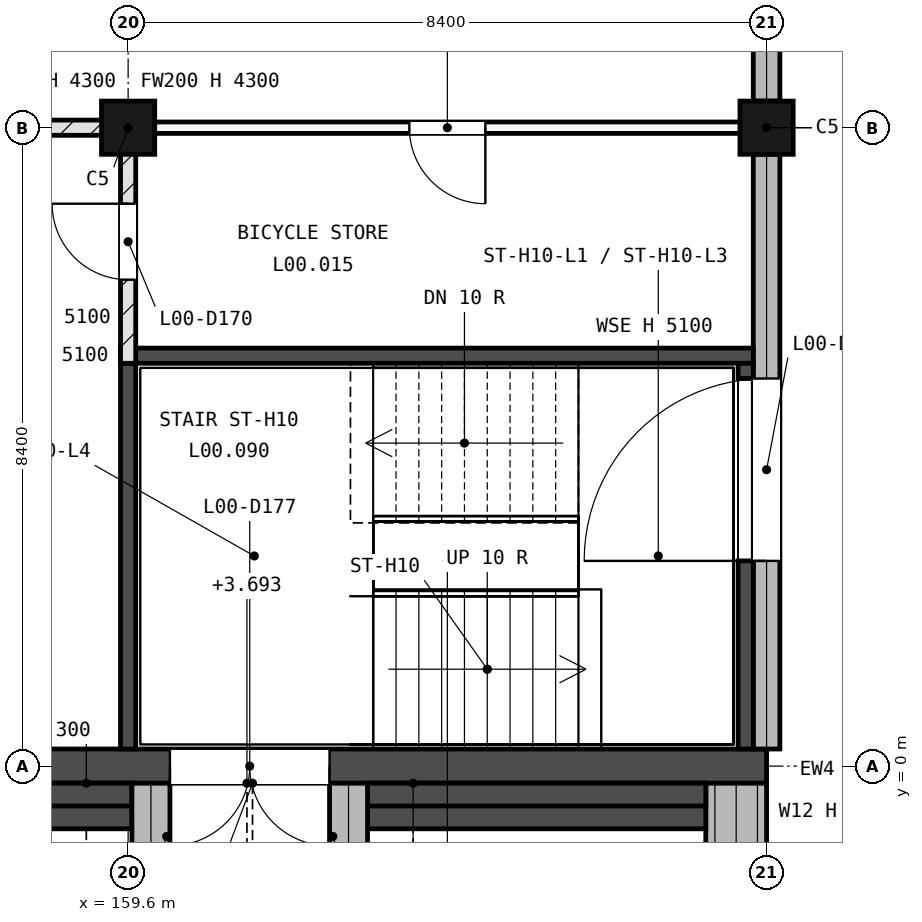
"""IFC4 building model, lengths in metres.
Left out: names, types, materials, properties, quantities, classifications, styles, units other than length and angle.
Written with IfcOpenShell. Run it as: python <this file> out.ifc"""

import sys

from ifc_helpers import new_model, si_unit, direction, frame, frame_2d, origin, origin_2d, place, context, subcontext, project, spatial, rectangle, extrude, element, fill, save


model = new_model("IFC4")
c1 = context("Model", 3, precision=1e-05, world=origin(), true_north=direction((0.0, 1.0)))
c2 = subcontext(c1, "Body", "Model", "MODEL_VIEW")
j1 = project(units=[si_unit("LENGTHUNIT", "METRE"), si_unit("PLANEANGLEUNIT", "RADIAN")], contexts=[c1])
p1 = place(None, origin())
s1 = spatial("IfcSite", under=j1, at=p1, CompositionType="ELEMENT")
p2 = place(p1, origin())
s2 = spatial("IfcBuilding", under=s1, at=p2, CompositionType="ELEMENT")
p3 = place(p2, origin())
s3 = spatial("IfcBuildingStorey", under=s2, at=p3, CompositionType="ELEMENT", Elevation=0.0)
for number, where, z_axis, x_axis in (
    (1, (159.6, 8.4, -0.3), (0.0, 0.0, 1.0), (1.0, 0.0, 0.0)),
    (2, (168.0, 8.4, -0.3), (0.0, 0.0, 1.0), (1.0, 0.0, 0.0)),
):
    element("IfcColumn", number, at=place(p3, frame(where, z_axis=z_axis, x_axis=x_axis)), inside=s3, PredefinedType="COLUMN", context=c2, shape_type="SweptSolid", body=[
        extrude(rectangle(XDim=0.7, YDim=0.7, at=origin_2d()), origin(), (0.0, 0.0, 1.0), 5.4),
    ])
p4 = place(p3, frame((0.0, 0.0, -0.3), z_axis=(0.0, 0.0, 1.0), x_axis=(1.0, 0.0, 0.0)))
e3 = element("IfcWall", 3, at=p4, inside=s3, PredefinedType="SOLIDWALL", context=c2, shape_type="SweptSolid", body=[
    extrude(rectangle(XDim=168.0, YDim=0.45, at=frame_2d((84.0, 0.0))), origin(), (0.0, 0.0, 1.0), 5.4),
])
p5 = place(p4, frame((34.8, 0.0, 2.7)))
e4 = element("IfcOpeningElement", 4, at=p5, cuts=e3, PredefinedType="OPENING", context=c2, shape_type="SweptSolid", body=[
    extrude(rectangle(XDim=1.8, YDim=1.2, at=frame_2d((0.9, 0.6))), frame((0.0, 0.235, 0.0), z_axis=(0.0, -1.0, 0.0), x_axis=(1.0, 0.0, 0.0)), (0.0, 0.0, 1.0), 0.47),
])
p6 = place(p4, frame((69.075, 0.0, 1.5)))
e5 = element("IfcOpeningElement", 5, at=p6, cuts=e3, PredefinedType="OPENING", context=c2, shape_type="SweptSolid", body=[
    extrude(rectangle(XDim=0.45, YDim=2.4, at=frame_2d((0.225, 1.2))), frame((0.0, 0.235, 0.0), z_axis=(0.0, -1.0, 0.0), x_axis=(1.0, 0.0, 0.0)), (0.0, 0.0, 1.0), 0.47),
])
p7 = place(p4, frame((73.275, 0.0, 1.5)))
e6 = element("IfcOpeningElement", 6, at=p7, cuts=e3, PredefinedType="OPENING", context=c2, shape_type="SweptSolid", body=[
    extrude(rectangle(XDim=0.45, YDim=2.4, at=frame_2d((0.225, 1.2))), frame((0.0, 0.235, 0.0), z_axis=(0.0, -1.0, 0.0), x_axis=(1.0, 0.0, 0.0)), (0.0, 0.0, 1.0), 0.47),
])
p8 = place(p4, frame((135.0, 0.0, 2.7)))
e7 = element("IfcOpeningElement", 7, at=p8, cuts=e3, PredefinedType="OPENING", context=c2, shape_type="SweptSolid", body=[
    extrude(rectangle(XDim=1.8, YDim=1.2, at=frame_2d((0.9, 0.6))), frame((0.0, 0.235, 0.0), z_axis=(0.0, -1.0, 0.0), x_axis=(1.0, 0.0, 0.0)), (0.0, 0.0, 1.0), 0.47),
])
p9 = place(p4, frame((144.0, 0.0, 2.7)))
e8 = element("IfcOpeningElement", 8, at=p9, cuts=e3, PredefinedType="OPENING", context=c2, shape_type="SweptSolid", body=[
    extrude(rectangle(XDim=1.8, YDim=1.2, at=frame_2d((0.9, 0.6))), frame((0.0, 0.235, 0.0), z_axis=(0.0, -1.0, 0.0), x_axis=(1.0, 0.0, 0.0)), (0.0, 0.0, 1.0), 0.47),
])
p10 = place(p4, frame((114.6, 0.0, 0.3), z_axis=(0.0, 0.0, 1.0), x_axis=(-1.0, 0.0, 0.0)))
e9 = element("IfcOpeningElement", 9, at=p10, cuts=e3, PredefinedType="OPENING", context=c2, shape_type="SweptSolid", body=[
    extrude(rectangle(XDim=2.1, YDim=2.2, at=frame_2d((1.05, 1.1))), frame((0.0, 0.235, 0.0), z_axis=(0.0, -1.0, 0.0), x_axis=(1.0, 0.0, 0.0)), (0.0, 0.0, 1.0), 0.47),
])
p11 = place(p4, frame((117.3, 0.0, 0.3), z_axis=(0.0, 0.0, 1.0), x_axis=(-1.0, 0.0, 0.0)))
e10 = element("IfcOpeningElement", 10, at=p11, cuts=e3, PredefinedType="OPENING", context=c2, shape_type="SweptSolid", body=[
    extrude(rectangle(XDim=2.1, YDim=2.2, at=frame_2d((1.05, 1.1))), frame((0.0, 0.235, 0.0), z_axis=(0.0, -1.0, 0.0), x_axis=(1.0, 0.0, 0.0)), (0.0, 0.0, 1.0), 0.47),
])
p12 = place(p4, frame((106.05, 0.0, 0.3), z_axis=(0.0, 0.0, 1.0), x_axis=(-1.0, 0.0, 0.0)))
e11 = element("IfcOpeningElement", 11, at=p12, cuts=e3, PredefinedType="OPENING", context=c2, shape_type="SweptSolid", body=[
    extrude(rectangle(XDim=2.1, YDim=2.2, at=frame_2d((1.05, 1.1))), frame((0.0, 0.235, 0.0), z_axis=(0.0, -1.0, 0.0), x_axis=(1.0, 0.0, 0.0)), (0.0, 0.0, 1.0), 0.47),
])
p13 = place(p4, frame((57.25, 0.0, 0.3), z_axis=(0.0, 0.0, 1.0), x_axis=(-1.0, 0.0, 0.0)))
e12 = element("IfcOpeningElement", 12, at=p13, cuts=e3, PredefinedType="OPENING", context=c2, shape_type="SweptSolid", body=[
    extrude(rectangle(XDim=2.1, YDim=2.2, at=frame_2d((1.05, 1.1))), frame((0.0, 0.235, 0.0), z_axis=(0.0, -1.0, 0.0), x_axis=(1.0, 0.0, 0.0)), (0.0, 0.0, 1.0), 0.47),
])
p14 = place(p4, frame((120.75, 0.0, 0.3), z_axis=(0.0, 0.0, 1.0), x_axis=(-1.0, 0.0, 0.0)))
e13 = element("IfcOpeningElement", 13, at=p14, cuts=e3, PredefinedType="OPENING", context=c2, shape_type="SweptSolid", body=[
    extrude(rectangle(XDim=2.1, YDim=2.2, at=frame_2d((1.05, 1.1))), frame((0.0, 0.235, 0.0), z_axis=(0.0, -1.0, 0.0), x_axis=(1.0, 0.0, 0.0)), (0.0, 0.0, 1.0), 0.47),
])
p15 = place(p4, frame((124.95, 0.0, 0.3), z_axis=(0.0, 0.0, 1.0), x_axis=(-1.0, 0.0, 0.0)))
e14 = element("IfcOpeningElement", 14, at=p15, cuts=e3, PredefinedType="OPENING", context=c2, shape_type="SweptSolid", body=[
    extrude(rectangle(XDim=2.1, YDim=2.2, at=frame_2d((1.05, 1.1))), frame((0.0, 0.235, 0.0), z_axis=(0.0, -1.0, 0.0), x_axis=(1.0, 0.0, 0.0)), (0.0, 0.0, 1.0), 0.47),
])
p16 = place(p4, frame((19.45, 0.0, 0.3), z_axis=(0.0, 0.0, 1.0), x_axis=(-1.0, 0.0, 0.0)))
e15 = element("IfcOpeningElement", 15, at=p16, cuts=e3, PredefinedType="OPENING", context=c2, shape_type="SweptSolid", body=[
    extrude(rectangle(XDim=2.1, YDim=2.2, at=frame_2d((1.05, 1.1))), frame((0.0, 0.235, 0.0), z_axis=(0.0, -1.0, 0.0), x_axis=(1.0, 0.0, 0.0)), (0.0, 0.0, 1.0), 0.47),
])
p17 = place(p4, frame((162.25, 0.0, 0.3), z_axis=(0.0, 0.0, 1.0), x_axis=(-1.0, 0.0, 0.0)))
e16 = element("IfcOpeningElement", 16, at=p17, cuts=e3, PredefinedType="OPENING", context=c2, shape_type="SweptSolid", body=[
    extrude(rectangle(XDim=2.1, YDim=2.2, at=frame_2d((1.05, 1.1))), frame((0.0, 0.235, 0.0), z_axis=(0.0, -1.0, 0.0), x_axis=(1.0, 0.0, 0.0)), (0.0, 0.0, 1.0), 0.47),
])
p18 = place(p4, frame((4.8, 0.0, 0.3), z_axis=(0.0, 0.0, 1.0), x_axis=(-1.0, 0.0, 0.0)))
e17 = element("IfcOpeningElement", 17, at=p18, cuts=e3, PredefinedType="OPENING", context=c2, shape_type="SweptSolid", body=[
    extrude(rectangle(XDim=1.2, YDim=2.2, at=frame_2d((0.6, 1.1))), frame((0.0, 0.235, 0.0), z_axis=(0.0, -1.0, 0.0), x_axis=(1.0, 0.0, 0.0)), (0.0, 0.0, 1.0), 0.47),
])
p19 = place(p4, frame((64.8, 0.0, 0.3), z_axis=(0.0, 0.0, 1.0), x_axis=(-1.0, 0.0, 0.0)))
e18 = element("IfcOpeningElement", 18, at=p19, cuts=e3, PredefinedType="OPENING", context=c2, shape_type="SweptSolid", body=[
    extrude(rectangle(XDim=1.2, YDim=2.2, at=frame_2d((0.6, 1.1))), frame((0.0, 0.235, 0.0), z_axis=(0.0, -1.0, 0.0), x_axis=(1.0, 0.0, 0.0)), (0.0, 0.0, 1.0), 0.47),
])
p20 = place(p4, frame((81.0, 0.0, 0.3), z_axis=(0.0, 0.0, 1.0), x_axis=(-1.0, 0.0, 0.0)))
e19 = element("IfcOpeningElement", 19, at=p20, cuts=e3, PredefinedType="OPENING", context=c2, shape_type="SweptSolid", body=[
    extrude(rectangle(XDim=2.4, YDim=2.4, at=frame_2d((1.2, 1.2))), frame((0.0, 0.235, 0.0), z_axis=(0.0, -1.0, 0.0), x_axis=(1.0, 0.0, 0.0)), (0.0, 0.0, 1.0), 0.47),
])
p21 = place(p4, frame((97.8, 0.0, 0.3), z_axis=(0.0, 0.0, 1.0), x_axis=(-1.0, 0.0, 0.0)))
e20 = element("IfcOpeningElement", 20, at=p21, cuts=e3, PredefinedType="OPENING", context=c2, shape_type="SweptSolid", body=[
    extrude(rectangle(XDim=2.4, YDim=2.4, at=frame_2d((1.2, 1.2))), frame((0.0, 0.235, 0.0), z_axis=(0.0, -1.0, 0.0), x_axis=(1.0, 0.0, 0.0)), (0.0, 0.0, 1.0), 0.47),
])
p22 = place(p4, frame((139.8, 0.0, 0.3), z_axis=(0.0, 0.0, 1.0), x_axis=(-1.0, 0.0, 0.0)))
e21 = element("IfcOpeningElement", 21, at=p22, cuts=e3, PredefinedType="OPENING", context=c2, shape_type="SweptSolid", body=[
    extrude(rectangle(XDim=2.4, YDim=2.1, at=frame_2d((1.2, 1.05))), frame((0.0, 0.235, 0.0), z_axis=(0.0, -1.0, 0.0), x_axis=(1.0, 0.0, 0.0)), (0.0, 0.0, 1.0), 0.47),
])
p23 = place(p4, frame((156.3, 0.0, 0.3), z_axis=(0.0, 0.0, 1.0), x_axis=(-1.0, 0.0, 0.0)))
e22 = element("IfcOpeningElement", 22, at=p23, cuts=e3, PredefinedType="OPENING", context=c2, shape_type="SweptSolid", body=[
    extrude(rectangle(XDim=1.8, YDim=2.2, at=frame_2d((0.9, 1.1))), frame((0.0, 0.235, 0.0), z_axis=(0.0, -1.0, 0.0), x_axis=(1.0, 0.0, 0.0)), (0.0, 0.0, 1.0), 0.47),
])
p24 = place(p3, frame((168.0, 0.225, 0.0), z_axis=(0.0, 0.0, 1.0), x_axis=(0.0, 1.0, 0.0)))
e23 = element("IfcWall", 23, at=p24, inside=s3, PredefinedType="STANDARD", context=c2, shape_type="SweptSolid", body=[
    extrude(rectangle(XDim=7.825, YDim=0.35, at=frame_2d((3.913, 0.0))), origin(), (0.0, 0.0, 1.0), 5.1),
])
p25 = place(p24, frame((4.875, 0.0, 0.0), z_axis=(0.0, 0.0, 1.0), x_axis=(-1.0, 0.0, 0.0)))
e24 = element("IfcOpeningElement", 24, at=p25, cuts=e23, PredefinedType="OPENING", context=c2, shape_type="SweptSolid", body=[
    extrude(rectangle(XDim=2.4, YDim=2.2, at=frame_2d((1.2, 1.1))), frame((0.0, 0.185, 0.0), z_axis=(0.0, -1.0, 0.0), x_axis=(1.0, 0.0, 0.0)), (0.0, 0.0, 1.0), 0.37),
])
p26 = place(p3, frame((168.0, 8.75, 0.0), z_axis=(0.0, 0.0, 1.0), x_axis=(0.0, 1.0, 0.0)))
e25 = element("IfcWall", 25, at=p26, inside=s3, PredefinedType="STANDARD", context=c2, shape_type="SweptSolid", body=[
    extrude(rectangle(XDim=7.7, YDim=0.35, at=frame_2d((3.85, 0.0))), origin(), (0.0, 0.0, 1.0), 4.45),
])
p27 = place(p26, frame((2.8, 0.0, 0.0), z_axis=(0.0, 0.0, 1.0), x_axis=(-1.0, 0.0, 0.0)))
e26 = element("IfcOpeningElement", 26, at=p27, cuts=e25, PredefinedType="OPENING", context=c2, shape_type="SweptSolid", body=[
    extrude(rectangle(XDim=2.1, YDim=2.2, at=frame_2d((1.05, 1.1))), frame((0.0, 0.185, 0.0), z_axis=(0.0, -1.0, 0.0), x_axis=(1.0, 0.0, 0.0)), (0.0, 0.0, 1.0), 0.37),
])
p28 = place(p26, frame((7.0, 0.0, 0.0), z_axis=(0.0, 0.0, 1.0), x_axis=(-1.0, 0.0, 0.0)))
e27 = element("IfcOpeningElement", 27, at=p28, cuts=e25, PredefinedType="OPENING", context=c2, shape_type="SweptSolid", body=[
    extrude(rectangle(XDim=2.1, YDim=2.2, at=frame_2d((1.05, 1.1))), frame((0.0, 0.185, 0.0), z_axis=(0.0, -1.0, 0.0), x_axis=(1.0, 0.0, 0.0)), (0.0, 0.0, 1.0), 0.37),
])
p29 = place(p3, frame((167.6, -0.225, 0.0), z_axis=(0.0, 0.0, 1.0), x_axis=(0.0, -1.0, 0.0)))
e28 = element("IfcWall", 28, at=p29, inside=s3, PredefinedType="SOLIDWALL", context=c2, shape_type="SweptSolid", body=[
    extrude(rectangle(XDim=0.9, YDim=0.8, at=frame_2d((0.45, 0.0))), origin(), (0.0, 0.0, 1.0), 5.1),
])
p30 = place(p3, frame((156.8, -0.525, 0.0), z_axis=(0.0, 0.0, 1.0), x_axis=(1.0, 0.0, 0.0)))
e29 = element("IfcWall", 29, at=p30, inside=s3, PredefinedType="SOLIDWALL", context=c2, shape_type="SweptSolid", body=[
    extrude(rectangle(XDim=2.85, YDim=0.6, at=frame_2d((1.425, 0.0))), origin(), (0.0, 0.0, 1.0), 0.45),
])
p31 = place(p3, frame((156.8, -0.375, 0.45), z_axis=(0.0, 0.0, 1.0), x_axis=(1.0, 0.0, 0.0)))
e30 = element("IfcWall", 30, at=p31, inside=s3, PredefinedType="SOLIDWALL", context=c2, shape_type="SweptSolid", body=[
    extrude(rectangle(XDim=2.85, YDim=0.3, at=frame_2d((1.425, 0.0))), origin(), (0.0, 0.0, 1.0), 0.45),
])
p32 = place(p3, frame((162.75, -0.525, 0.0), z_axis=(0.0, 0.0, 1.0), x_axis=(1.0, 0.0, 0.0)))
e31 = element("IfcWall", 31, at=p32, inside=s3, PredefinedType="SOLIDWALL", context=c2, shape_type="SweptSolid", body=[
    extrude(rectangle(XDim=4.45, YDim=0.6, at=frame_2d((2.225, 0.0))), origin(), (0.0, 0.0, 1.0), 0.45),
])
p33 = place(p3, frame((162.75, -0.375, 0.45), z_axis=(0.0, 0.0, 1.0), x_axis=(1.0, 0.0, 0.0)))
e32 = element("IfcWall", 32, at=p33, inside=s3, PredefinedType="SOLIDWALL", context=c2, shape_type="SweptSolid", body=[
    extrude(rectangle(XDim=4.45, YDim=0.3, at=frame_2d((2.225, 0.0))), origin(), (0.0, 0.0, 1.0), 0.45),
])
for number, where, z_axis, x_axis in (
    (33, (159.9, -0.225, 0.0), (0.0, 0.0, 1.0), (0.0, -1.0, 0.0)),
    (34, (162.5, -0.225, 0.0), (0.0, 0.0, 1.0), (0.0, -1.0, 0.0)),
):
    element("IfcWall", number, at=place(p3, frame(where, z_axis=z_axis, x_axis=x_axis)), inside=s3, PredefinedType="SOLIDWALL", context=c2, shape_type="SweptSolid", body=[
        extrude(rectangle(XDim=1.4, YDim=0.5, at=frame_2d((0.7, 0.0))), origin(), (0.0, 0.0, 1.0), 3.08),
    ])
p34 = place(p3, frame((159.5, 5.4, 0.0), z_axis=(0.0, 0.0, 1.0), x_axis=(1.0, 0.0, 0.0)))
e35 = element("IfcWall", 35, at=p34, inside=s3, PredefinedType="SHEAR", context=c2, shape_type="SweptSolid", body=[
    extrude(rectangle(XDim=8.325, YDim=0.2, at=frame_2d((4.163, 0.0))), origin(), (0.0, 0.0, 1.0), 5.1),
])
p35 = place(p3, frame((159.6, 0.225, 0.0), z_axis=(0.0, 0.0, 1.0), x_axis=(0.0, 1.0, 0.0)))
e36 = element("IfcWall", 36, at=p35, inside=s3, PredefinedType="SHEAR", context=c2, shape_type="SweptSolid", body=[
    extrude(rectangle(XDim=5.075, YDim=0.2, at=frame_2d((2.538, 0.0))), origin(), (0.0, 0.0, 1.0), 5.1),
])
p36 = place(p3, frame((167.725, 0.225, 0.0), z_axis=(0.0, 0.0, 1.0), x_axis=(0.0, 1.0, 0.0)))
e37 = element("IfcWall", 37, at=p36, inside=s3, PredefinedType="SHEAR", context=c2, shape_type="SweptSolid", body=[
    extrude(rectangle(XDim=2.475, YDim=0.2, at=frame_2d((1.237, 0.0))), origin(), (0.0, 0.0, 1.0), 5.1),
])
p37 = place(p3, frame((167.725, 5.1, 0.0), z_axis=(0.0, 0.0, 1.0), x_axis=(0.0, 1.0, 0.0)))
e38 = element("IfcWall", 38, at=p37, inside=s3, PredefinedType="SHEAR", context=c2, shape_type="SweptSolid", body=[
    extrude(rectangle(XDim=0.2, YDim=0.2, at=frame_2d((0.1, 0.0))), origin(), (0.0, 0.0, 1.0), 5.1),
])
p38 = place(p3, frame((117.6, 8.4, 0.0), z_axis=(0.0, 0.0, 1.0), x_axis=(1.0, 0.0, 0.0)))
e39 = element("IfcWall", 39, at=p38, inside=s3, PredefinedType="SOLIDWALL", context=c2, shape_type="SweptSolid", body=[
    extrude(rectangle(XDim=42.0, YDim=0.2, at=frame_2d((21.0, 0.0))), origin(), (0.0, 0.0, 1.0), 4.3),
])
p39 = place(p38, frame((37.3, 0.0, 0.0)))
e40 = element("IfcOpeningElement", 40, at=p39, cuts=e39, PredefinedType="OPENING", context=c2, shape_type="SweptSolid", body=[
    extrude(rectangle(XDim=1.0, YDim=2.1, at=frame_2d((0.5, 1.05))), frame((0.0, 0.11, 0.0), z_axis=(0.0, -1.0, 0.0), x_axis=(1.0, 0.0, 0.0)), (0.0, 0.0, 1.0), 0.22),
])
p40 = place(p3, frame((159.6, 8.4, 0.0), z_axis=(0.0, 0.0, 1.0), x_axis=(1.0, 0.0, 0.0)))
e41 = element("IfcWall", 41, at=p40, inside=s3, PredefinedType="PARTITIONING", context=c2, shape_type="SweptSolid", body=[
    extrude(rectangle(XDim=8.4, YDim=0.15, at=frame_2d((4.2, 0.0))), origin(), (0.0, 0.0, 1.0), 4.3),
])
p41 = place(p40, frame((3.7, 0.0, 0.0)))
e42 = element("IfcOpeningElement", 42, at=p41, cuts=e41, PredefinedType="OPENING", context=c2, shape_type="SweptSolid", body=[
    extrude(rectangle(XDim=1.0, YDim=2.1, at=frame_2d((0.5, 1.05))), frame((0.0, 0.085, 0.0), z_axis=(0.0, -1.0, 0.0), x_axis=(1.0, 0.0, 0.0)), (0.0, 0.0, 1.0), 0.17),
])
p42 = place(p3, frame((159.6, 5.3, 0.0), z_axis=(0.0, 0.0, 1.0), x_axis=(0.0, 1.0, 0.0)))
e43 = element("IfcWall", 43, at=p42, inside=s3, PredefinedType="SOLIDWALL", context=c2, shape_type="SweptSolid", body=[
    extrude(rectangle(XDim=3.0, YDim=0.2, at=frame_2d((1.5, 0.0))), origin(), (0.0, 0.0, 1.0), 5.1),
])
p43 = place(p42, frame((1.1, 0.0, 0.0)))
e44 = element("IfcOpeningElement", 44, at=p43, cuts=e43, PredefinedType="OPENING", context=c2, shape_type="SweptSolid", body=[
    extrude(rectangle(XDim=1.0, YDim=2.1, at=frame_2d((0.5, 1.05))), frame((0.0, 0.11, 0.0), z_axis=(0.0, -1.0, 0.0), x_axis=(1.0, 0.0, 0.0)), (0.0, 0.0, 1.0), 0.22),
])
p44 = place(p25, origin())
e45 = element("IfcDoor", 45, at=p44, inside=s3, OperationType="SINGLE_SWING_LEFT", PredefinedType="DOOR", context=c2, shape_type="SweptSolid", body=[
    extrude(rectangle(XDim=2.4, YDim=0.013, at=frame_2d((1.2, 0.007))), frame((0.0, 0.115, 0.0), z_axis=(0.0, -1.0, 0.0), x_axis=(1.0, 0.0, 0.0)), (0.0, 0.0, 1.0), 0.23),
    extrude(rectangle(XDim=0.075, YDim=2.112, at=frame_2d((0.038, 1.069))), frame((0.0, 0.125, 0.0), z_axis=(0.0, -1.0, 0.0), x_axis=(1.0, 0.0, 0.0)), (0.0, 0.0, 1.0), 0.25),
    extrude(rectangle(XDim=0.075, YDim=2.112, at=frame_2d((2.362, 1.069))), frame((0.0, 0.125, 0.0), z_axis=(0.0, -1.0, 0.0), x_axis=(1.0, 0.0, 0.0)), (0.0, 0.0, 1.0), 0.25),
    extrude(rectangle(XDim=2.4, YDim=0.075, at=frame_2d((1.2, 2.163))), frame((0.0, 0.115, 0.0), z_axis=(0.0, -1.0, 0.0), x_axis=(1.0, 0.0, 0.0)), (0.0, 0.0, 1.0), 0.23),
    extrude(rectangle(XDim=2.25, YDim=2.112, at=frame_2d((1.2, 1.069))), frame((0.0, 0.025, 0.0), z_axis=(0.0, -1.0, 0.0), x_axis=(1.0, 0.0, 0.0)), (0.0, 0.0, 1.0), 0.05),
])
fill(e24, e45)
p45 = place(p17, origin())
e46 = element("IfcDoor", 46, at=p45, inside=s3, OperationType="SINGLE_SWING_LEFT", PredefinedType="DOOR", context=c2, shape_type="SweptSolid", body=[
    extrude(rectangle(XDim=2.1, YDim=0.013, at=frame_2d((1.05, 0.007))), frame((0.0, 0.115, 0.0), z_axis=(0.0, -1.0, 0.0), x_axis=(1.0, 0.0, 0.0)), (0.0, 0.0, 1.0), 0.23),
    extrude(rectangle(XDim=0.075, YDim=2.112, at=frame_2d((0.038, 1.069))), frame((0.0, 0.125, 0.0), z_axis=(0.0, -1.0, 0.0), x_axis=(1.0, 0.0, 0.0)), (0.0, 0.0, 1.0), 0.25),
    extrude(rectangle(XDim=0.075, YDim=2.112, at=frame_2d((2.062, 1.069))), frame((0.0, 0.125, 0.0), z_axis=(0.0, -1.0, 0.0), x_axis=(1.0, 0.0, 0.0)), (0.0, 0.0, 1.0), 0.25),
    extrude(rectangle(XDim=2.1, YDim=0.075, at=frame_2d((1.05, 2.163))), frame((0.0, 0.115, 0.0), z_axis=(0.0, -1.0, 0.0), x_axis=(1.0, 0.0, 0.0)), (0.0, 0.0, 1.0), 0.23),
    extrude(rectangle(XDim=1.95, YDim=2.112, at=frame_2d((1.05, 1.069))), frame((0.0, 0.025, 0.0), z_axis=(0.0, -1.0, 0.0), x_axis=(1.0, 0.0, 0.0)), (0.0, 0.0, 1.0), 0.05),
])
fill(e16, e46)
p46 = place(p43, origin())
e47 = element("IfcDoor", 47, at=p46, inside=s3, OperationType="SINGLE_SWING_LEFT", PredefinedType="DOOR", context=c2, shape_type="SweptSolid", body=[
    extrude(rectangle(XDim=1.0, YDim=2.1, at=frame_2d((0.5, 1.05))), frame((0.0, 0.025, 0.0), z_axis=(0.0, -1.0, 0.0), x_axis=(1.0, 0.0, 0.0)), (0.0, 0.0, 1.0), 0.05),
])
fill(e44, e47)
p47 = place(p41, origin())
e48 = element("IfcDoor", 48, at=p47, inside=s3, OperationType="SINGLE_SWING_RIGHT", PredefinedType="DOOR", context=c2, shape_type="SweptSolid", body=[
    extrude(rectangle(XDim=1.0, YDim=2.1, at=frame_2d((0.5, 1.05))), frame((0.0, 0.025, 0.0), z_axis=(0.0, -1.0, 0.0), x_axis=(1.0, 0.0, 0.0)), (0.0, 0.0, 1.0), 0.05),
])
fill(e42, e48)
save(model, sys.argv[1])
